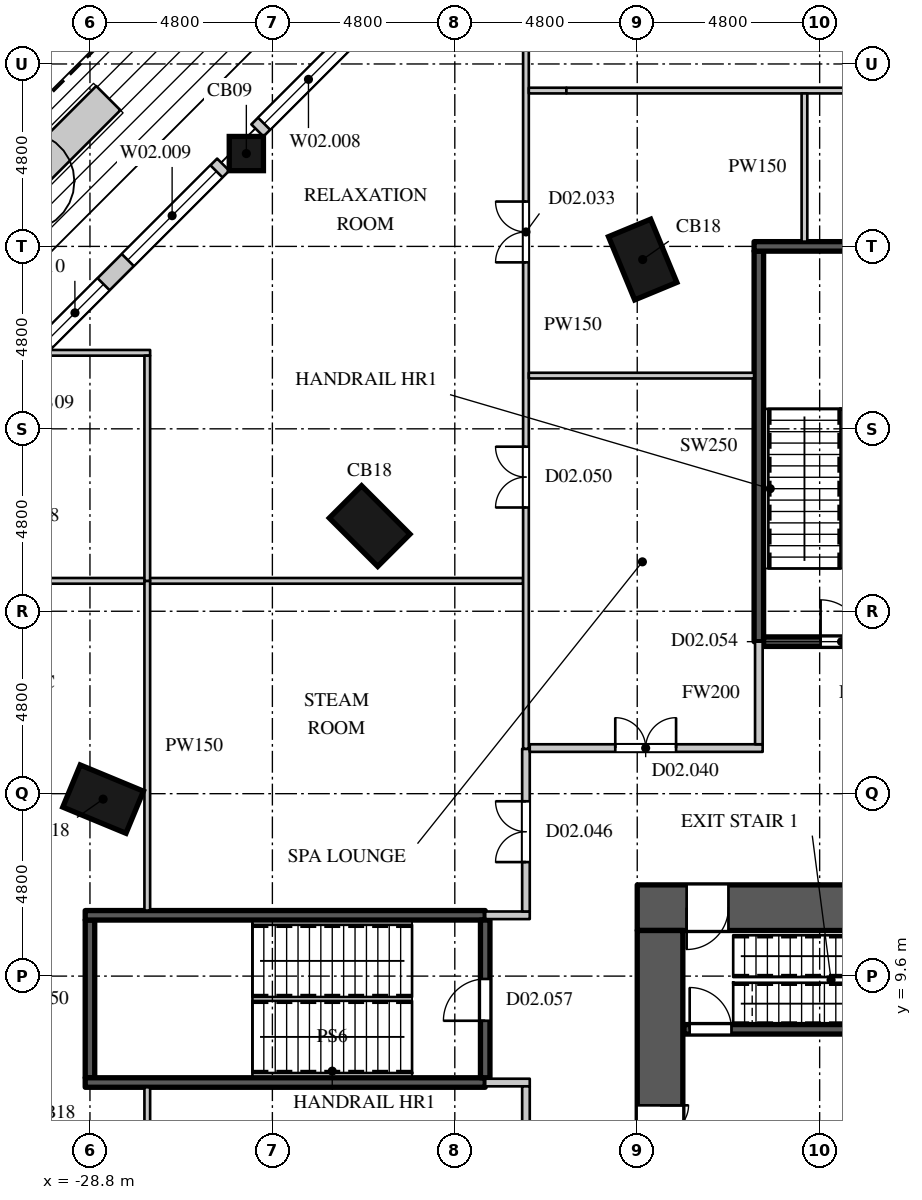
"""IFC4 building model, lengths in metres.
Left out: names, types, materials, properties, quantities, classifications, styles, units other than length and angle.
Written with IfcOpenShell. Run it as: python <this file> out.ifc"""

import sys

from ifc_helpers import new_model, si_unit, direction, frame, frame_2d, origin, origin_2d, place, context, subcontext, project, spatial, rectangle, extrude, element, fill, save


model = new_model("IFC4")
c1 = context("Model", 3, precision=1e-05, world=origin(), true_north=direction((0.0, 1.0)))
c2 = subcontext(c1, "Body", "Model", "MODEL_VIEW")
j1 = project(units=[si_unit("LENGTHUNIT", "METRE"), si_unit("PLANEANGLEUNIT", "RADIAN")], contexts=[c1])
p1 = place(None, origin())
s1 = spatial("IfcSite", under=j1, at=p1, CompositionType="ELEMENT")
p2 = place(p1, origin())
s2 = spatial("IfcBuilding", under=s1, at=p2, CompositionType="ELEMENT")
p3 = place(p2, frame((0.0, 0.0, 11.0)))
s3 = spatial("IfcBuildingStorey", under=s2, at=p3, CompositionType="ELEMENT", Elevation=11.0)
for number, where, z_axis, x_axis in (
    (1, (-28.454, 14.257, 0.0), (0.0, 0.0, 1.0), (-0.383, -0.924, 0.0)),
    (2, (-21.441, 21.441, 0.0), (0.0, 0.0, 1.0), (-0.707, -0.707, 0.0)),
    (3, (-14.257, 28.454, 0.0), (0.0, 0.0, 1.0), (-0.924, -0.383, 0.0)),
):
    element("IfcColumn", number, at=place(p3, frame(where, z_axis=z_axis, x_axis=x_axis)), inside=s3, PredefinedType="COLUMN", context=c2, shape_type="SweptSolid", body=[
        extrude(rectangle(XDim=1.2, YDim=1.8, at=origin_2d()), origin(), (0.0, 0.0, 1.0), 5.0),
    ])
p4 = place(p3, frame((-24.685, 31.243, 0.0), z_axis=(0.0, 0.0, 1.0), x_axis=(1.0, 0.0, 0.0)))
e4 = element("IfcColumn", 4, at=p4, inside=s3, PredefinedType="COLUMN", context=c2, shape_type="SweptSolid", body=[
    extrude(rectangle(XDim=0.9, YDim=0.9, at=origin_2d()), origin(), (0.0, 0.0, 1.0), 5.0),
])
p5 = place(p3, frame((-18.737, 37.509, 0.0), z_axis=(0.0, 0.0, 1.0), x_axis=(-0.707106781187, -0.707106781187, 0.0)))
e5 = element("IfcWall", 5, at=p5, inside=s3, PredefinedType="ELEMENTEDWALL", context=c2, shape_type="SweptSolid", body=[
    extrude(rectangle(XDim=8.0, YDim=0.45, at=frame_2d((4.0, 0.0))), origin(), (0.0, 0.0, 1.0), 3.8),
])
p6 = place(p5, frame((0.8, 0.0, 0.0)))
e6 = element("IfcOpeningElement", 6, at=p6, cuts=e5, PredefinedType="OPENING", context=c2, shape_type="SweptSolid", body=[
    extrude(rectangle(XDim=2.4, YDim=2.7, at=frame_2d((1.2, 1.35))), frame((0.0, 0.235, 0.0), z_axis=(0.0, -1.0, 0.0), x_axis=(1.0, 0.0, 0.0)), (0.0, 0.0, 1.0), 0.47),
])
p7 = place(p5, frame((4.45, 0.0, 1.05)))
e7 = element("IfcOpeningElement", 7, at=p7, cuts=e5, PredefinedType="OPENING", context=c2, shape_type="SweptSolid", body=[
    extrude(rectangle(XDim=3.3, YDim=2.7, at=frame_2d((1.65, 1.35))), frame((0.0, 0.235, 0.0), z_axis=(0.0, -1.0, 0.0), x_axis=(1.0, 0.0, 0.0)), (0.0, 0.0, 1.0), 0.47),
])
p8 = place(p3, frame((-25.294, 30.952, 0.0), z_axis=(0.0, 0.0, 1.0), x_axis=(-0.707106781187, -0.707106781187, 0.0)))
e8 = element("IfcWall", 8, at=p8, inside=s3, PredefinedType="ELEMENTEDWALL", context=c2, shape_type="SweptSolid", body=[
    extrude(rectangle(XDim=8.0, YDim=0.45, at=frame_2d((4.0, 0.0))), origin(), (0.0, 0.0, 1.0), 3.8),
])
p9 = place(p8, frame((0.25, 0.0, 1.05)))
e9 = element("IfcOpeningElement", 9, at=p9, cuts=e8, PredefinedType="OPENING", context=c2, shape_type="SweptSolid", body=[
    extrude(rectangle(XDim=3.3, YDim=2.7, at=frame_2d((1.65, 1.35))), frame((0.0, 0.235, 0.0), z_axis=(0.0, -1.0, 0.0), x_axis=(1.0, 0.0, 0.0)), (0.0, 0.0, 1.0), 0.47),
])
p10 = place(p8, frame((4.45, 0.0, 1.05)))
e10 = element("IfcOpeningElement", 10, at=p10, cuts=e8, PredefinedType="OPENING", context=c2, shape_type="SweptSolid", body=[
    extrude(rectangle(XDim=2.13, YDim=2.7, at=frame_2d((1.065, 1.35))), frame((0.0, 0.235, 0.0), z_axis=(0.0, -1.0, 0.0), x_axis=(1.0, 0.0, 0.0)), (0.0, 0.0, 1.0), 0.47),
])
p11 = place(p3, frame((-28.317, 32.702, 0.0), z_axis=(0.0, 0.0, 1.0), x_axis=(-0.707106781187, -0.707106781187, 0.0)))
e11 = element("IfcWall", 11, at=p11, inside=s3, PredefinedType="USERDEFINED", context=c2, shape_type="SweptSolid", body=[
    extrude(rectangle(XDim=6.201, YDim=0.9, at=frame_2d((3.1, 0.0))), origin(), (0.0, 0.0, 1.0), 0.9),
])
p12 = place(p3, frame((-14.4, 11.4, 0.0), z_axis=(0.0, 0.0, 1.0), x_axis=(1.0, 0.0, 0.0)))
e12 = element("IfcWall", 12, at=p12, inside=s3, PredefinedType="SHEAR", context=c2, shape_type="SweptSolid", body=[
    extrude(rectangle(XDim=28.8, YDim=1.2, at=frame_2d((14.4, 0.0))), origin(), (0.0, 0.0, 1.0), 5.0),
])
p13 = place(p12, frame((1.3, 0.0, 0.0)))
e13 = element("IfcOpeningElement", 13, at=p13, cuts=e12, PredefinedType="OPENING", context=c2, shape_type="SweptSolid", body=[
    extrude(rectangle(XDim=1.1, YDim=2.2, at=frame_2d((0.55, 1.1))), frame((0.0, 0.61, 0.0), z_axis=(0.0, -1.0, 0.0), x_axis=(1.0, 0.0, 0.0)), (0.0, 0.0, 1.0), 1.22),
])
p14 = place(p12, frame((26.4, 0.0, 0.0)))
e14 = element("IfcOpeningElement", 14, at=p14, cuts=e12, PredefinedType="OPENING", context=c2, shape_type="SweptSolid", body=[
    extrude(rectangle(XDim=1.1, YDim=2.2, at=frame_2d((0.55, 1.1))), frame((0.0, 0.61, 0.0), z_axis=(0.0, -1.0, 0.0), x_axis=(1.0, 0.0, 0.0)), (0.0, 0.0, 1.0), 1.22),
])
p15 = place(p3, frame((-13.8, -10.8, 0.0), z_axis=(0.0, 0.0, 1.0), x_axis=(0.0, 1.0, 0.0)))
e15 = element("IfcWall", 15, at=p15, inside=s3, PredefinedType="SHEAR", context=c2, shape_type="SweptSolid", body=[
    extrude(rectangle(XDim=21.6, YDim=1.2, at=frame_2d((10.8, 0.0))), origin(), (0.0, 0.0, 1.0), 5.0),
])
p16 = place(p15, frame((15.5, 0.0, 0.0)))
e16 = element("IfcOpeningElement", 16, at=p16, cuts=e15, PredefinedType="OPENING", context=c2, shape_type="SweptSolid", body=[
    extrude(rectangle(XDim=1.5, YDim=2.4, at=frame_2d((0.75, 1.2))), frame((0.0, 0.61, 0.0), z_axis=(0.0, -1.0, 0.0), x_axis=(1.0, 0.0, 0.0)), (0.0, 0.0, 1.0), 1.22),
])
p17 = place(p15, frame((4.5, 0.0, 0.0)))
e17 = element("IfcOpeningElement", 17, at=p17, cuts=e15, PredefinedType="OPENING", context=c2, shape_type="SweptSolid", body=[
    extrude(rectangle(XDim=1.5, YDim=2.4, at=frame_2d((0.75, 1.2))), frame((0.0, 0.61, 0.0), z_axis=(0.0, -1.0, 0.0), x_axis=(1.0, 0.0, 0.0)), (0.0, 0.0, 1.0), 1.22),
])
for number, where, z_axis, x_axis in (
    (18, (-18.4, 6.8, 0.0), (0.0, 0.0, 1.0), (1.0, 0.0, 0.0)),
    (19, (-18.4, 11.2, 0.0), (0.0, 0.0, 1.0), (1.0, 0.0, 0.0)),
):
    element("IfcWall", number, at=place(p3, frame(where, z_axis=z_axis, x_axis=x_axis)), inside=s3, PredefinedType="PARTITIONING", context=c2, shape_type="SweptSolid", body=[
        extrude(rectangle(XDim=1.172, YDim=0.2, at=frame_2d((0.586, 0.0))), origin(), (0.0, 0.0, 1.0), 4.65),
    ])
p18 = place(p3, frame((-17.328, 3.1, 0.0), z_axis=(0.0, 0.0, 1.0), x_axis=(0.0, 1.0, 0.0)))
e20 = element("IfcWall", 20, at=p18, inside=s3, PredefinedType="PARTITIONING", context=c2, shape_type="SweptSolid", body=[
    extrude(rectangle(XDim=3.6, YDim=0.2, at=frame_2d((1.8, 0.0))), origin(), (0.0, 0.0, 1.0), 4.65),
])
p19 = place(p3, frame((-17.328, 11.3, 0.0), z_axis=(0.0, 0.0, 1.0), x_axis=(0.0, 1.0, 0.0)))
e21 = element("IfcWall", 21, at=p19, inside=s3, PredefinedType="PARTITIONING", context=c2, shape_type="SweptSolid", body=[
    extrude(rectangle(XDim=4.28, YDim=0.2, at=frame_2d((2.14, 0.0))), origin(), (0.0, 0.0, 1.0), 4.65),
])
p20 = place(p19, frame((1.3, 0.0, 0.0)))
e22 = element("IfcOpeningElement", 22, at=p20, cuts=e21, PredefinedType="OPENING", context=c2, shape_type="SweptSolid", body=[
    extrude(rectangle(XDim=1.6, YDim=2.4, at=frame_2d((0.8, 1.2))), frame((0.0, 0.11, 0.0), z_axis=(0.0, -1.0, 0.0), x_axis=(1.0, 0.0, 0.0)), (0.0, 0.0, 1.0), 0.22),
])
p21 = place(p3, frame((-17.228, 15.6, 0.0), z_axis=(0.0, 0.0, 1.0), x_axis=(1.0, 0.0, 0.0)))
e23 = element("IfcWall", 23, at=p21, inside=s3, PredefinedType="PARTITIONING", context=c2, shape_type="SweptSolid", body=[
    extrude(rectangle(XDim=6.128, YDim=0.2, at=frame_2d((3.064, 0.0))), origin(), (0.0, 0.0, 1.0), 4.65),
])
p22 = place(p21, frame((2.25, 0.0, 0.0)))
e24 = element("IfcOpeningElement", 24, at=p22, cuts=e23, PredefinedType="OPENING", context=c2, shape_type="SweptSolid", body=[
    extrude(rectangle(XDim=1.6, YDim=2.4, at=frame_2d((0.8, 1.2))), frame((0.0, 0.11, 0.0), z_axis=(0.0, -1.0, 0.0), x_axis=(1.0, 0.0, 0.0)), (0.0, 0.0, 1.0), 0.22),
])
p23 = place(p3, frame((-11.2, 15.7, 0.0), z_axis=(0.0, 0.0, 1.0), x_axis=(0.0, 1.0, 0.0)))
e25 = element("IfcWall", 25, at=p23, inside=s3, PredefinedType="PARTITIONING", context=c2, shape_type="SweptSolid", body=[
    extrude(rectangle(XDim=2.7, YDim=0.2, at=frame_2d((1.35, 0.0))), origin(), (0.0, 0.0, 1.0), 4.65),
])
p24 = place(p3, frame((-36.006, 20.0, 0.0), z_axis=(0.0, 0.0, 1.0), x_axis=(1.0, 0.0, 0.0)))
e26 = element("IfcWall", 26, at=p24, inside=s3, PredefinedType="PARTITIONING", context=c2, shape_type="SweptSolid", body=[
    extrude(rectangle(XDim=18.603, YDim=0.15, at=frame_2d((9.301, 0.0))), origin(), (0.0, 0.0, 1.0), 4.65),
])
p25 = place(p24, frame((1.2, 0.0, 0.0)))
e27 = element("IfcOpeningElement", 27, at=p25, cuts=e26, PredefinedType="OPENING", context=c2, shape_type="SweptSolid", body=[
    extrude(rectangle(XDim=0.9, YDim=2.2, at=frame_2d((0.45, 1.1))), frame((0.0, 0.085, 0.0), z_axis=(0.0, -1.0, 0.0), x_axis=(1.0, 0.0, 0.0)), (0.0, 0.0, 1.0), 0.17),
])
p26 = place(p24, frame((5.05, 0.0, 0.0)))
e28 = element("IfcOpeningElement", 28, at=p26, cuts=e26, PredefinedType="OPENING", context=c2, shape_type="SweptSolid", body=[
    extrude(rectangle(XDim=0.9, YDim=2.2, at=frame_2d((0.45, 1.1))), frame((0.0, 0.085, 0.0), z_axis=(0.0, -1.0, 0.0), x_axis=(1.0, 0.0, 0.0)), (0.0, 0.0, 1.0), 0.17),
])
p27 = place(p3, frame((-30.006, 26.0, 0.0), z_axis=(0.0, 0.0, 1.0), x_axis=(1.0, 0.0, 0.0)))
e29 = element("IfcWall", 29, at=p27, inside=s3, PredefinedType="PARTITIONING", context=c2, shape_type="SweptSolid", body=[
    extrude(rectangle(XDim=2.789, YDim=0.15, at=frame_2d((1.395, 0.0))), origin(), (0.0, 0.0, 1.0), 4.65),
])
p28 = place(p3, frame((-27.292, 3.1, 0.0), z_axis=(0.0, 0.0, 1.0), x_axis=(0.0, 1.0, 0.0)))
e30 = element("IfcWall", 30, at=p28, inside=s3, PredefinedType="PARTITIONING", context=c2, shape_type="SweptSolid", body=[
    extrude(rectangle(XDim=3.575, YDim=0.15, at=frame_2d((1.788, 0.0))), origin(), (0.0, 0.0, 1.0), 4.65),
])
p29 = place(p3, frame((-27.292, 11.325, 0.0), z_axis=(0.0, 0.0, 1.0), x_axis=(0.0, 1.0, 0.0)))
e31 = element("IfcWall", 31, at=p29, inside=s3, PredefinedType="PARTITIONING", context=c2, shape_type="SweptSolid", body=[
    extrude(rectangle(XDim=8.675, YDim=0.15, at=frame_2d((4.337, 0.0))), origin(), (0.0, 0.0, 1.0), 4.65),
])
p30 = place(p3, frame((-27.292, 20.0, 0.0), z_axis=(0.0, 0.0, 1.0), x_axis=(0.0, 1.0, 0.0)))
e32 = element("IfcWall", 32, at=p30, inside=s3, PredefinedType="PARTITIONING", context=c2, shape_type="SweptSolid", body=[
    extrude(rectangle(XDim=5.925, YDim=0.15, at=frame_2d((2.962, 0.0))), origin(), (0.0, 0.0, 1.0), 4.65),
])
p31 = place(p3, frame((-17.328, 15.58, 0.0), z_axis=(0.0, 0.0, 1.0), x_axis=(0.0, 1.0, 0.0)))
e33 = element("IfcWall", 33, at=p31, inside=s3, PredefinedType="PARTITIONING", context=c2, shape_type="SweptSolid", body=[
    extrude(rectangle(XDim=22.275, YDim=0.15, at=frame_2d((11.137, 0.0))), origin(), (0.0, 0.0, 1.0), 4.65),
])
p32 = place(p31, frame((12.8, 0.0, 0.0)))
e34 = element("IfcOpeningElement", 34, at=p32, cuts=e33, PredefinedType="OPENING", context=c2, shape_type="SweptSolid", body=[
    extrude(rectangle(XDim=1.6, YDim=2.4, at=frame_2d((0.8, 1.2))), frame((0.0, 0.085, 0.0), z_axis=(0.0, -1.0, 0.0), x_axis=(1.0, 0.0, 0.0)), (0.0, 0.0, 1.0), 0.17),
])
p33 = place(p31, frame((6.35, 0.0, 0.0)))
e35 = element("IfcOpeningElement", 35, at=p33, cuts=e33, PredefinedType="OPENING", context=c2, shape_type="SweptSolid", body=[
    extrude(rectangle(XDim=1.6, YDim=2.4, at=frame_2d((0.8, 1.2))), frame((0.0, 0.085, 0.0), z_axis=(0.0, -1.0, 0.0), x_axis=(1.0, 0.0, 0.0)), (0.0, 0.0, 1.0), 0.17),
])
p34 = place(p3, frame((-17.253, 25.4, 0.0), z_axis=(0.0, 0.0, 1.0), x_axis=(1.0, 0.0, 0.0)))
e36 = element("IfcWall", 36, at=p34, inside=s3, PredefinedType="PARTITIONING", context=c2, shape_type="SweptSolid", body=[
    extrude(rectangle(XDim=5.928, YDim=0.15, at=frame_2d((2.964, 0.0))), origin(), (0.0, 0.0, 1.0), 4.65),
])
p35 = place(p3, frame((-17.253, 32.9, 0.0), z_axis=(0.0, 0.0, 1.0), x_axis=(1.0, 0.0, 0.0)))
e37 = element("IfcWall", 37, at=p35, inside=s3, PredefinedType="PARTITIONING", context=c2, shape_type="SweptSolid", body=[
    extrude(rectangle(XDim=0.989, YDim=0.15, at=frame_2d((0.495, 0.0))), origin(), (0.0, 0.0, 1.0), 4.65),
])
p36 = place(p3, frame((-16.264, 32.9, 0.0), z_axis=(0.0, 0.0, 1.0), x_axis=(1.0, 0.0, 0.0)))
e38 = element("IfcWall", 38, at=p36, inside=s3, PredefinedType="PARTITIONING", context=c2, shape_type="SweptSolid", body=[
    extrude(rectangle(XDim=11.464, YDim=0.15, at=frame_2d((5.732, 0.0))), origin(), (0.0, 0.0, 1.0), 3.4),
])
p37 = place(p3, frame((-10.0, 28.925, 0.0), z_axis=(0.0, 0.0, 1.0), x_axis=(0.0, 1.0, 0.0)))
e39 = element("IfcWall", 39, at=p37, inside=s3, PredefinedType="PARTITIONING", context=c2, shape_type="SweptSolid", body=[
    extrude(rectangle(XDim=3.9, YDim=0.15, at=frame_2d((1.95, 0.0))), origin(), (0.0, 0.0, 1.0), 4.65),
])
p38 = place(p3, frame((-28.8, 6.925, 0.0), z_axis=(0.0, 0.0, 1.0), x_axis=(0.0, 1.0, 0.0)))
e40 = element("IfcWall", 40, at=p38, inside=s3, PredefinedType="SHEAR", context=c2, shape_type="SweptSolid", body=[
    extrude(rectangle(XDim=4.15, YDim=0.25, at=frame_2d((2.075, 0.0))), origin(), (0.0, 0.0, 1.0), 4.65),
])
for number, where, z_axis, x_axis in (
    (41, (-28.925, 6.8, 0.0), (0.0, 0.0, 1.0), (1.0, 0.0, 0.0)),
    (42, (-28.925, 11.2, 0.0), (0.0, 0.0, 1.0), (1.0, 0.0, 0.0)),
):
    element("IfcWall", number, at=place(p3, frame(where, z_axis=z_axis, x_axis=x_axis)), inside=s3, PredefinedType="SHEAR", context=c2, shape_type="SweptSolid", body=[
        extrude(rectangle(XDim=10.525, YDim=0.25, at=frame_2d((5.263, 0.0))), origin(), (0.0, 0.0, 1.0), 4.65),
    ])
p39 = place(p3, frame((-18.4, 6.925, 0.0), z_axis=(0.0, 0.0, 1.0), x_axis=(0.0, 1.0, 0.0)))
e43 = element("IfcWall", 43, at=p39, inside=s3, PredefinedType="SHEAR", context=c2, shape_type="SweptSolid", body=[
    extrude(rectangle(XDim=4.15, YDim=0.25, at=frame_2d((2.075, 0.0))), origin(), (0.0, 0.0, 1.0), 4.65),
])
p40 = place(p39, frame((1.5, 0.0, 0.0)))
e44 = element("IfcOpeningElement", 44, at=p40, cuts=e43, PredefinedType="OPENING", context=c2, shape_type="SweptSolid", body=[
    extrude(rectangle(XDim=1.1, YDim=2.2, at=frame_2d((0.55, 1.1))), frame((0.0, 0.135, 0.0), z_axis=(0.0, -1.0, 0.0), x_axis=(1.0, 0.0, 0.0)), (0.0, 0.0, 1.0), 0.27),
])
p41 = place(p3, frame((-13.17, 8.2, 0.0), z_axis=(0.0, 0.0, 1.0), x_axis=(1.0, 0.0, 0.0)))
e45 = element("IfcWall", 45, at=p41, inside=s3, PredefinedType="SHEAR", context=c2, shape_type="SweptSolid", body=[
    extrude(rectangle(XDim=7.895, YDim=0.25, at=frame_2d((3.948, 0.0))), origin(), (0.0, 0.0, 1.0), 4.65),
])
p42 = place(p41, frame((0.15, 0.0, 0.0)))
e46 = element("IfcOpeningElement", 46, at=p42, cuts=e45, PredefinedType="OPENING", context=c2, shape_type="SweptSolid", body=[
    extrude(rectangle(XDim=1.1, YDim=2.2, at=frame_2d((0.55, 1.1))), frame((0.0, 0.135, 0.0), z_axis=(0.0, -1.0, 0.0), x_axis=(1.0, 0.0, 0.0)), (0.0, 0.0, 1.0), 0.27),
])
p43 = place(p3, frame((-11.2, 18.4, 0.0), z_axis=(0.0, 0.0, 1.0), x_axis=(0.0, 1.0, 0.0)))
e47 = element("IfcWall", 47, at=p43, inside=s3, PredefinedType="SHEAR", context=c2, shape_type="SweptSolid", body=[
    extrude(rectangle(XDim=10.275, YDim=0.25, at=frame_2d((5.138, 0.0))), origin(), (0.0, 0.0, 1.0), 4.65),
])
p44 = place(p3, frame((-11.075, 18.4, 0.0), z_axis=(0.0, 0.0, 1.0), x_axis=(1.0, 0.0, 0.0)))
e48 = element("IfcWall", 48, at=p44, inside=s3, PredefinedType="SHEAR", context=c2, shape_type="SweptSolid", body=[
    extrude(rectangle(XDim=4.15, YDim=0.25, at=frame_2d((2.075, 0.0))), origin(), (0.0, 0.0, 1.0), 4.65),
])
p45 = place(p44, frame((1.5, 0.0, 0.0)))
e49 = element("IfcOpeningElement", 49, at=p45, cuts=e48, PredefinedType="OPENING", context=c2, shape_type="SweptSolid", body=[
    extrude(rectangle(XDim=1.1, YDim=2.2, at=frame_2d((0.55, 1.1))), frame((0.0, 0.135, 0.0), z_axis=(0.0, -1.0, 0.0), x_axis=(1.0, 0.0, 0.0)), (0.0, 0.0, 1.0), 0.27),
])
p46 = place(p3, frame((-11.325, 28.8, 0.0), z_axis=(0.0, 0.0, 1.0), x_axis=(1.0, 0.0, 0.0)))
e50 = element("IfcWall", 50, at=p46, inside=s3, PredefinedType="SHEAR", context=c2, shape_type="SweptSolid", body=[
    extrude(rectangle(XDim=4.65, YDim=0.25, at=frame_2d((2.325, 0.0))), origin(), (0.0, 0.0, 1.0), 4.65),
])
p47 = place(p7, origin())
e51 = element("IfcWindow", 51, at=p47, inside=s3, PartitioningType="SINGLE_PANEL", PredefinedType="WINDOW", context=c2, shape_type="SweptSolid", body=[
    extrude(rectangle(XDim=3.3, YDim=2.7, at=frame_2d((1.65, 1.35))), frame((0.0, 0.135, 0.0), z_axis=(0.0, -1.0, 0.0), x_axis=(1.0, 0.0, 0.0)), (0.0, 0.0, 1.0), 0.06),
])
fill(e7, e51)
p48 = place(p9, origin())
e52 = element("IfcWindow", 52, at=p48, inside=s3, PartitioningType="SINGLE_PANEL", PredefinedType="WINDOW", context=c2, shape_type="SweptSolid", body=[
    extrude(rectangle(XDim=3.3, YDim=2.7, at=frame_2d((1.65, 1.35))), frame((0.0, 0.135, 0.0), z_axis=(0.0, -1.0, 0.0), x_axis=(1.0, 0.0, 0.0)), (0.0, 0.0, 1.0), 0.06),
])
fill(e9, e52)
p49 = place(p10, origin())
e53 = element("IfcWindow", 53, at=p49, inside=s3, PartitioningType="SINGLE_PANEL", PredefinedType="WINDOW", context=c2, shape_type="SweptSolid", body=[
    extrude(rectangle(XDim=2.13, YDim=2.7, at=frame_2d((1.065, 1.35))), frame((0.0, 0.135, 0.0), z_axis=(0.0, -1.0, 0.0), x_axis=(1.0, 0.0, 0.0)), (0.0, 0.0, 1.0), 0.06),
])
fill(e10, e53)
p50 = place(p42, origin())
e54 = element("IfcDoor", 54, at=p50, inside=s3, OperationType="SINGLE_SWING_LEFT", PredefinedType="DOOR", context=c2, shape_type="SweptSolid", body=[
    extrude(rectangle(XDim=1.1, YDim=2.2, at=frame_2d((0.55, 1.1))), frame((0.0, 0.025, 0.0), z_axis=(0.0, -1.0, 0.0), x_axis=(1.0, 0.0, 0.0)), (0.0, 0.0, 1.0), 0.05),
])
fill(e46, e54)
p51 = place(p32, origin())
e55 = element("IfcDoor", 55, at=p51, inside=s3, OperationType="DOUBLE_DOOR_SINGLE_SWING", PredefinedType="DOOR", context=c2, shape_type="SweptSolid", body=[
    extrude(rectangle(XDim=1.6, YDim=2.4, at=frame_2d((0.8, 1.2))), frame((0.0, 0.025, 0.0), z_axis=(0.0, -1.0, 0.0), x_axis=(1.0, 0.0, 0.0)), (0.0, 0.0, 1.0), 0.05),
])
fill(e34, e55)
p52 = place(p22, origin())
e56 = element("IfcDoor", 56, at=p52, inside=s3, OperationType="DOUBLE_DOOR_SINGLE_SWING", PredefinedType="DOOR", context=c2, shape_type="SweptSolid", body=[
    extrude(rectangle(XDim=1.6, YDim=2.4, at=frame_2d((0.8, 1.2))), frame((0.0, 0.025, 0.0), z_axis=(0.0, -1.0, 0.0), x_axis=(1.0, 0.0, 0.0)), (0.0, 0.0, 1.0), 0.05),
])
fill(e24, e56)
p53 = place(p20, origin())
e57 = element("IfcDoor", 57, at=p53, inside=s3, OperationType="DOUBLE_DOOR_SINGLE_SWING", PredefinedType="DOOR", context=c2, shape_type="SweptSolid", body=[
    extrude(rectangle(XDim=1.6, YDim=2.4, at=frame_2d((0.8, 1.2))), frame((0.0, 0.025, 0.0), z_axis=(0.0, -1.0, 0.0), x_axis=(1.0, 0.0, 0.0)), (0.0, 0.0, 1.0), 0.05),
])
fill(e22, e57)
p54 = place(p33, origin())
e58 = element("IfcDoor", 58, at=p54, inside=s3, OperationType="DOUBLE_DOOR_SINGLE_SWING", PredefinedType="DOOR", context=c2, shape_type="SweptSolid", body=[
    extrude(rectangle(XDim=1.6, YDim=2.4, at=frame_2d((0.8, 1.2))), frame((0.0, 0.025, 0.0), z_axis=(0.0, -1.0, 0.0), x_axis=(1.0, 0.0, 0.0)), (0.0, 0.0, 1.0), 0.05),
])
fill(e35, e58)
p55 = place(p45, origin())
e59 = element("IfcDoor", 59, at=p55, inside=s3, OperationType="SINGLE_SWING_LEFT", PredefinedType="DOOR", context=c2, shape_type="SweptSolid", body=[
    extrude(rectangle(XDim=1.1, YDim=2.2, at=frame_2d((0.55, 1.1))), frame((0.0, 0.025, 0.0), z_axis=(0.0, -1.0, 0.0), x_axis=(1.0, 0.0, 0.0)), (0.0, 0.0, 1.0), 0.05),
])
fill(e49, e59)
p56 = place(p40, origin())
e60 = element("IfcDoor", 60, at=p56, inside=s3, OperationType="SINGLE_SWING_LEFT", PredefinedType="DOOR", context=c2, shape_type="SweptSolid", body=[
    extrude(rectangle(XDim=1.1, YDim=2.2, at=frame_2d((0.55, 1.1))), frame((0.0, 0.025, 0.0), z_axis=(0.0, -1.0, 0.0), x_axis=(1.0, 0.0, 0.0)), (0.0, 0.0, 1.0), 0.05),
])
fill(e44, e60)
p57 = place(p16, origin())
e61 = element("IfcDoor", 61, at=p57, inside=s3, OperationType="DOUBLE_DOOR_SINGLE_SWING", PredefinedType="DOOR", context=c2, shape_type="SweptSolid", body=[
    extrude(rectangle(XDim=1.5, YDim=2.4, at=frame_2d((0.75, 1.2))), frame((0.0, 0.025, 0.0), z_axis=(0.0, -1.0, 0.0), x_axis=(1.0, 0.0, 0.0)), (0.0, 0.0, 1.0), 0.05),
])
fill(e16, e61)
p58 = place(p13, origin())
e62 = element("IfcDoor", 62, at=p58, inside=s3, OperationType="SINGLE_SWING_RIGHT", PredefinedType="DOOR", context=c2, shape_type="SweptSolid", body=[
    extrude(rectangle(XDim=1.1, YDim=2.2, at=frame_2d((0.55, 1.1))), frame((0.0, 0.025, 0.0), z_axis=(0.0, -1.0, 0.0), x_axis=(1.0, 0.0, 0.0)), (0.0, 0.0, 1.0), 0.05),
])
fill(e13, e62)
save(model, sys.argv[1])
